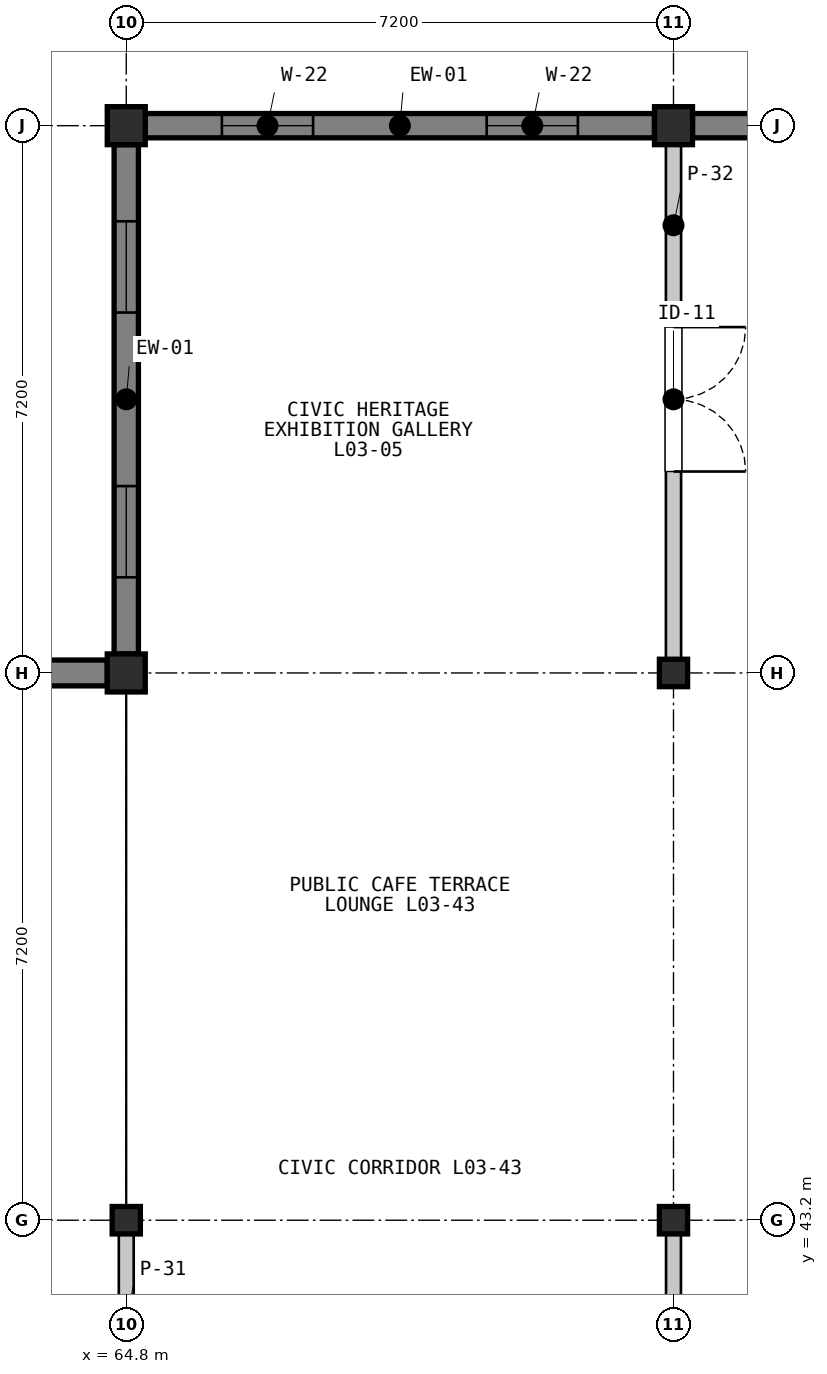
"""IFC4 building model, lengths in metres.
Left out: names, types, materials, properties, quantities, classifications, styles, units other than length and angle.
Written with IfcOpenShell. Run it as: python <this file> out.ifc"""

import sys

from ifc_helpers import new_model, si_unit, direction, frame, frame_2d, origin, origin_2d, place, context, subcontext, project, spatial, rectangle, i_section, extrude, element, fill, save


model = new_model("IFC4")
c1 = context("Model", 3, precision=1e-05, world=origin(), true_north=direction((0.0, 1.0)))
c2 = subcontext(c1, "Body", "Model", "MODEL_VIEW")
j1 = project(units=[si_unit("LENGTHUNIT", "METRE"), si_unit("PLANEANGLEUNIT", "RADIAN")], contexts=[c1])
p1 = place(None, origin())
s1 = spatial("IfcSite", under=j1, at=p1, CompositionType="ELEMENT")
p2 = place(p1, origin())
s2 = spatial("IfcBuilding", under=s1, at=p2, CompositionType="ELEMENT")
p3 = place(p2, frame((0.0, 0.0, 9.9)))
s3 = spatial("IfcBuildingStorey", under=s2, at=p3, CompositionType="ELEMENT", Elevation=9.9)
p4 = place(p3, frame((64.8, 43.2, 0.0), z_axis=(0.0, 0.0, 1.0), x_axis=(1.0, 0.0, 0.0)))
e1 = element("IfcColumn", 1, at=p4, inside=s3, PredefinedType="COLUMN", context=c2, shape_type="SweptSolid", body=[
    extrude(i_section(OverallWidth=0.371, OverallDepth=0.361, WebThickness=0.012, FlangeThickness=0.02, FilletRadius=0.015, at=origin_2d()), origin(), (0.0, 0.0, 1.0), 4.2),
])
for number, where, z_axis, x_axis in (
    (2, (64.8, 50.4, 0.0), (0.0, 0.0, 1.0), (1.0, 0.0, 0.0)),
    (3, (64.8, 57.6, 0.0), (0.0, 0.0, 1.0), (1.0, 0.0, 0.0)),
):
    element("IfcColumn", number, at=place(p3, frame(where, z_axis=z_axis, x_axis=x_axis)), inside=s3, PredefinedType="COLUMN", context=c2, shape_type="SweptSolid", body=[
        extrude(rectangle(XDim=0.5, YDim=0.5, at=origin_2d()), origin(), (0.0, 0.0, 1.0), 4.2),
    ])
for number, where, z_axis, x_axis in (
    (4, (72.0, 43.2, 0.0), (0.0, 0.0, 1.0), (1.0, 0.0, 0.0)),
    (5, (72.0, 50.4, 0.0), (0.0, 0.0, 1.0), (1.0, 0.0, 0.0)),
):
    element("IfcColumn", number, at=place(p3, frame(where, z_axis=z_axis, x_axis=x_axis)), inside=s3, PredefinedType="COLUMN", context=c2, shape_type="SweptSolid", body=[
        extrude(i_section(OverallWidth=0.371, OverallDepth=0.361, WebThickness=0.012, FlangeThickness=0.02, FilletRadius=0.015, at=origin_2d()), origin(), (0.0, 0.0, 1.0), 4.2),
    ])
p5 = place(p3, frame((72.0, 57.6, 0.0), z_axis=(0.0, 0.0, 1.0), x_axis=(1.0, 0.0, 0.0)))
e6 = element("IfcColumn", 6, at=p5, inside=s3, PredefinedType="COLUMN", context=c2, shape_type="SweptSolid", body=[
    extrude(rectangle(XDim=0.5, YDim=0.5, at=origin_2d()), origin(), (0.0, 0.0, 1.0), 4.2),
])
p6 = place(p3, frame((57.85, 50.4, 0.0), z_axis=(0.0, 0.0, 1.0), x_axis=(1.0, 0.0, 0.0)))
e7 = element("IfcWall", 7, at=p6, inside=s3, PredefinedType="SOLIDWALL", context=c2, shape_type="SweptSolid", body=[
    extrude(rectangle(XDim=6.7, YDim=0.34, at=frame_2d((3.35, 0.0))), origin(), (0.0, 0.0, 1.0), 3.398),
])
p7 = place(p6, frame((1.008, 0.0, 0.95)))
e8 = element("IfcOpeningElement", 8, at=p7, cuts=e7, PredefinedType="OPENING", context=c2, shape_type="SweptSolid", body=[
    extrude(rectangle(XDim=1.2, YDim=1.7, at=frame_2d((0.6, 0.85))), frame((0.0, 0.18, 0.0), z_axis=(0.0, -1.0, 0.0), x_axis=(1.0, 0.0, 0.0)), (0.0, 0.0, 1.0), 0.36),
])
p8 = place(p6, frame((4.492, 0.0, 0.95)))
e9 = element("IfcOpeningElement", 9, at=p8, cuts=e7, PredefinedType="OPENING", context=c2, shape_type="SweptSolid", body=[
    extrude(rectangle(XDim=1.2, YDim=1.7, at=frame_2d((0.6, 0.85))), frame((0.0, 0.18, 0.0), z_axis=(0.0, -1.0, 0.0), x_axis=(1.0, 0.0, 0.0)), (0.0, 0.0, 1.0), 0.36),
])
p9 = place(p3, frame((65.05, 57.6, 0.0), z_axis=(0.0, 0.0, 1.0), x_axis=(1.0, 0.0, 0.0)))
e10 = element("IfcWall", 10, at=p9, inside=s3, PredefinedType="SOLIDWALL", context=c2, shape_type="SweptSolid", body=[
    extrude(rectangle(XDim=6.7, YDim=0.32, at=frame_2d((3.35, 0.0))), origin(), (0.0, 0.0, 1.0), 3.418),
])
p10 = place(p9, frame((1.008, 0.0, 0.95)))
e11 = element("IfcOpeningElement", 11, at=p10, cuts=e10, PredefinedType="OPENING", context=c2, shape_type="SweptSolid", body=[
    extrude(rectangle(XDim=1.2, YDim=1.7, at=frame_2d((0.6, 0.85))), frame((0.0, 0.17, 0.0), z_axis=(0.0, -1.0, 0.0), x_axis=(1.0, 0.0, 0.0)), (0.0, 0.0, 1.0), 0.34),
])
p11 = place(p9, frame((4.492, 0.0, 0.95)))
e12 = element("IfcOpeningElement", 12, at=p11, cuts=e10, PredefinedType="OPENING", context=c2, shape_type="SweptSolid", body=[
    extrude(rectangle(XDim=1.2, YDim=1.7, at=frame_2d((0.6, 0.85))), frame((0.0, 0.17, 0.0), z_axis=(0.0, -1.0, 0.0), x_axis=(1.0, 0.0, 0.0)), (0.0, 0.0, 1.0), 0.34),
])
p12 = place(p3, frame((64.8, 50.65, 0.0), z_axis=(0.0, 0.0, 1.0), x_axis=(0.0, 1.0, 0.0)))
e13 = element("IfcWall", 13, at=p12, inside=s3, PredefinedType="SOLIDWALL", context=c2, shape_type="SweptSolid", body=[
    extrude(rectangle(XDim=6.7, YDim=0.32, at=frame_2d((3.35, 0.0))), origin(), (0.0, 0.0, 1.0), 3.487),
])
p13 = place(p12, frame((1.008, 0.0, 0.95)))
e14 = element("IfcOpeningElement", 14, at=p13, cuts=e13, PredefinedType="OPENING", context=c2, shape_type="SweptSolid", body=[
    extrude(rectangle(XDim=1.2, YDim=1.7, at=frame_2d((0.6, 0.85))), frame((0.0, 0.17, 0.0), z_axis=(0.0, -1.0, 0.0), x_axis=(1.0, 0.0, 0.0)), (0.0, 0.0, 1.0), 0.34),
])
p14 = place(p12, frame((4.492, 0.0, 0.95)))
e15 = element("IfcOpeningElement", 15, at=p14, cuts=e13, PredefinedType="OPENING", context=c2, shape_type="SweptSolid", body=[
    extrude(rectangle(XDim=1.2, YDim=1.7, at=frame_2d((0.6, 0.85))), frame((0.0, 0.17, 0.0), z_axis=(0.0, -1.0, 0.0), x_axis=(1.0, 0.0, 0.0)), (0.0, 0.0, 1.0), 0.34),
])
p15 = place(p3, frame((72.25, 57.6, 0.0), z_axis=(0.0, 0.0, 1.0), x_axis=(1.0, 0.0, 0.0)))
e16 = element("IfcWall", 16, at=p15, inside=s3, PredefinedType="SOLIDWALL", context=c2, shape_type="SweptSolid", body=[
    extrude(rectangle(XDim=6.7, YDim=0.32, at=frame_2d((3.35, 0.0))), origin(), (0.0, 0.0, 1.0), 3.418),
])
p16 = place(p15, frame((1.008, 0.0, 0.95)))
e17 = element("IfcOpeningElement", 17, at=p16, cuts=e16, PredefinedType="OPENING", context=c2, shape_type="SweptSolid", body=[
    extrude(rectangle(XDim=1.2, YDim=1.7, at=frame_2d((0.6, 0.85))), frame((0.0, 0.17, 0.0), z_axis=(0.0, -1.0, 0.0), x_axis=(1.0, 0.0, 0.0)), (0.0, 0.0, 1.0), 0.34),
])
p17 = place(p15, frame((4.492, 0.0, 0.95)))
e18 = element("IfcOpeningElement", 18, at=p17, cuts=e16, PredefinedType="OPENING", context=c2, shape_type="SweptSolid", body=[
    extrude(rectangle(XDim=1.2, YDim=1.7, at=frame_2d((0.6, 0.85))), frame((0.0, 0.17, 0.0), z_axis=(0.0, -1.0, 0.0), x_axis=(1.0, 0.0, 0.0)), (0.0, 0.0, 1.0), 0.34),
])
p18 = place(p3, frame((64.8, 36.12, 0.0), z_axis=(0.0, 0.0, 1.0), x_axis=(0.0, 1.0, 0.0)))
e19 = element("IfcWall", 19, at=p18, inside=s3, PredefinedType="PARTITIONING", context=c2, shape_type="SweptSolid", body=[
    extrude(rectangle(XDim=6.96, YDim=0.196, at=frame_2d((3.48, 0.0))), origin(), (0.0, 0.0, 1.0), 3.388),
])
p19 = place(p18, frame((2.555, 0.0, 0.0)))
e20 = element("IfcOpeningElement", 20, at=p19, cuts=e19, PredefinedType="OPENING", context=c2, shape_type="SweptSolid", body=[
    extrude(rectangle(XDim=1.85, YDim=2.45, at=frame_2d((0.925, 1.225))), frame((0.0, 0.108, 0.0), z_axis=(0.0, -1.0, 0.0), x_axis=(1.0, 0.0, 0.0)), (0.0, 0.0, 1.0), 0.216),
])
p20 = place(p18, frame((0.45, 0.0, 1.05)))
e21 = element("IfcOpeningElement", 21, at=p20, cuts=e19, PredefinedType="OPENING", context=c2, shape_type="SweptSolid", body=[
    extrude(rectangle(XDim=1.85, YDim=1.18, at=frame_2d((0.925, 0.59))), frame((0.0, 0.108, 0.0), z_axis=(0.0, -1.0, 0.0), x_axis=(1.0, 0.0, 0.0)), (0.0, 0.0, 1.0), 0.216),
])
p21 = place(p3, frame((72.0, 43.08, 0.0), z_axis=(0.0, 0.0, 1.0), x_axis=(0.0, -1.0, 0.0)))
e22 = element("IfcWall", 22, at=p21, inside=s3, PredefinedType="PARTITIONING", context=c2, shape_type="SweptSolid", body=[
    extrude(rectangle(XDim=6.96, YDim=0.196, at=frame_2d((3.48, 0.0))), origin(), (0.0, 0.0, 1.0), 3.408),
])
p22 = place(p3, frame((72.0, 57.48, 0.0), z_axis=(0.0, 0.0, 1.0), x_axis=(0.0, -1.0, 0.0)))
e23 = element("IfcWall", 23, at=p22, inside=s3, PredefinedType="PARTITIONING", context=c2, shape_type="SweptSolid", body=[
    extrude(rectangle(XDim=6.96, YDim=0.2, at=frame_2d((3.48, 0.0))), origin(), (0.0, 0.0, 1.0), 3.408),
])
p23 = place(p22, frame((2.53, 0.0, 0.0)))
e24 = element("IfcOpeningElement", 24, at=p23, cuts=e23, PredefinedType="OPENING", context=c2, shape_type="SweptSolid", body=[
    extrude(rectangle(XDim=1.9, YDim=2.45, at=frame_2d((0.95, 1.225))), frame((0.0, 0.11, 0.0), z_axis=(0.0, -1.0, 0.0), x_axis=(1.0, 0.0, 0.0)), (0.0, 0.0, 1.0), 0.22),
])
p24 = place(p10, origin())
e25 = element("IfcWindow", 25, at=p24, inside=s3, PartitioningType="SINGLE_PANEL", PredefinedType="WINDOW", context=c2, shape_type="SweptSolid", body=[
    extrude(rectangle(XDim=1.2, YDim=1.7, at=frame_2d((0.6, 0.85))), frame((0.0, 0.03, 0.0), z_axis=(0.0, -1.0, 0.0), x_axis=(1.0, 0.0, 0.0)), (0.0, 0.0, 1.0), 0.06),
])
fill(e11, e25)
p25 = place(p11, origin())
e26 = element("IfcWindow", 26, at=p25, inside=s3, PartitioningType="SINGLE_PANEL", PredefinedType="WINDOW", context=c2, shape_type="SweptSolid", body=[
    extrude(rectangle(XDim=1.2, YDim=1.7, at=frame_2d((0.6, 0.85))), frame((0.0, 0.03, 0.0), z_axis=(0.0, -1.0, 0.0), x_axis=(1.0, 0.0, 0.0)), (0.0, 0.0, 1.0), 0.06),
])
fill(e12, e26)
p26 = place(p13, origin())
e27 = element("IfcWindow", 27, at=p26, inside=s3, PartitioningType="SINGLE_PANEL", PredefinedType="WINDOW", context=c2, shape_type="SweptSolid", body=[
    extrude(rectangle(XDim=1.2, YDim=1.7, at=frame_2d((0.6, 0.85))), frame((0.0, 0.03, 0.0), z_axis=(0.0, -1.0, 0.0), x_axis=(1.0, 0.0, 0.0)), (0.0, 0.0, 1.0), 0.06),
])
fill(e14, e27)
p27 = place(p14, origin())
e28 = element("IfcWindow", 28, at=p27, inside=s3, PartitioningType="SINGLE_PANEL", PredefinedType="WINDOW", context=c2, shape_type="SweptSolid", body=[
    extrude(rectangle(XDim=1.2, YDim=1.7, at=frame_2d((0.6, 0.85))), frame((0.0, 0.03, 0.0), z_axis=(0.0, -1.0, 0.0), x_axis=(1.0, 0.0, 0.0)), (0.0, 0.0, 1.0), 0.06),
])
fill(e15, e28)
p28 = place(p23, origin())
e29 = element("IfcDoor", 29, at=p28, inside=s3, OperationType="DOUBLE_DOOR_SINGLE_SWING", PredefinedType="DOOR", context=c2, shape_type="SweptSolid", body=[
    extrude(rectangle(XDim=1.9, YDim=2.45, at=frame_2d((0.95, 1.225))), frame((0.0, 0.025, 0.0), z_axis=(0.0, -1.0, 0.0), x_axis=(1.0, 0.0, 0.0)), (0.0, 0.0, 1.0), 0.05),
])
fill(e24, e29)
save(model, sys.argv[1])
